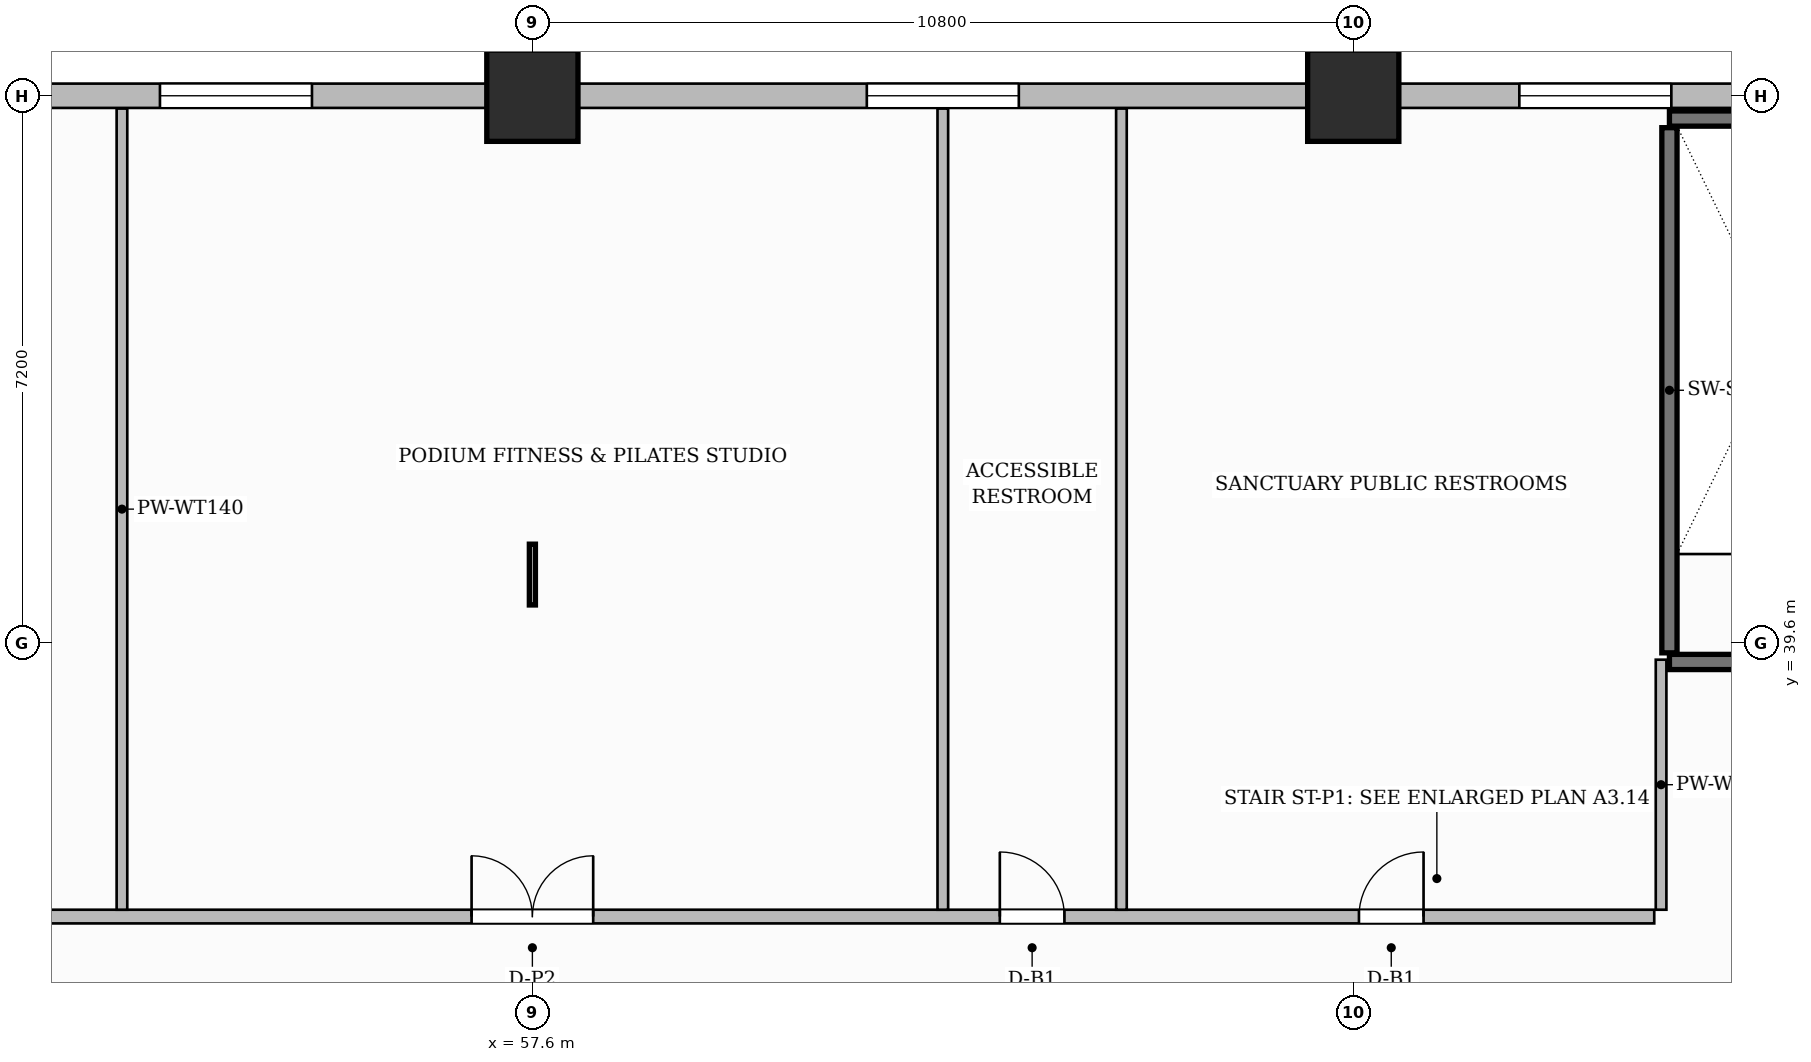
"""IFC4 building model, lengths in metres.
Left out: names, types, materials, properties, quantities, classifications, styles, units other than length and angle.
Written with IfcOpenShell. Run it as: python <this file> out.ifc"""

import sys

from ifc_helpers import new_model, si_unit, direction, frame, frame_2d, origin, origin_2d, place, context, subcontext, project, spatial, rectangle, extrude, source, transform, mapped, element, fill, save


model = new_model("IFC4")
c1 = context("Model", 3, precision=1e-05, world=origin(), true_north=direction((0.0, 1.0)))
c2 = subcontext(c1, "Body", "Model", "MODEL_VIEW")
j1 = project(units=[si_unit("LENGTHUNIT", "METRE"), si_unit("PLANEANGLEUNIT", "RADIAN")], contexts=[c1])
p1 = place(None, origin())
s1 = spatial("IfcSite", under=j1, at=p1, CompositionType="ELEMENT")
p2 = place(p1, origin())
s2 = spatial("IfcBuilding", under=s1, at=p2, CompositionType="ELEMENT")
p3 = place(p2, frame((0.0, 0.0, 21.6)))
s3 = spatial("IfcBuildingStorey", under=s2, at=p3, CompositionType="ELEMENT", Elevation=21.6)
m1 = source(origin(), c2, "Body", "SweptSolid", [
    extrude(rectangle(XDim=1.2, YDim=1.2, at=origin_2d()), origin(), (0.0, 0.0, 1.0), 5.4),
])
for number, where, z_axis, x_axis in (
    (1, (57.6, 46.8, 0.0), (0.0, 0.0, 1.0), (1.0, 0.0, 0.0)),
    (2, (68.4, 46.8, 0.0), (0.0, 0.0, 1.0), (1.0, 0.0, 0.0)),
):
    element("IfcColumn", number, at=place(p3, frame(where, z_axis=z_axis, x_axis=x_axis)), inside=s3, PredefinedType="COLUMN", context=c2, shape_type="MappedRepresentation", body=[
        mapped(m1, transform((0.0, 0.0, 0.0), scale=1.0)),
    ])
p4 = place(p3, frame((72.56, 39.47, 0.0), z_axis=(0.0, 0.0, 1.0), x_axis=(0.0, 1.0, 0.0)))
e3 = element("IfcWall", 3, at=p4, inside=s3, PredefinedType="SHEAR", context=c2, shape_type="SweptSolid", body=[
    extrude(rectangle(XDim=6.91, YDim=0.2, at=frame_2d((3.455, 0.0))), origin(), (0.0, 0.0, 1.0), 5.4),
])
p5 = place(p3, frame((72.56, 46.5, 0.0), z_axis=(0.0, 0.0, 1.0), x_axis=(1.0, 0.0, 0.0)))
e4 = element("IfcWall", 4, at=p5, inside=s3, PredefinedType="SHEAR", context=c2, shape_type="SweptSolid", body=[
    extrude(rectangle(XDim=2.94, YDim=0.2, at=frame_2d((1.47, 0.0))), origin(), (0.0, 0.0, 1.0), 5.4),
])
p6 = place(p3, frame((72.56, 39.35, 0.0), z_axis=(0.0, 0.0, 1.0), x_axis=(1.0, 0.0, 0.0)))
e5 = element("IfcWall", 5, at=p6, inside=s3, PredefinedType="SHEAR", context=c2, shape_type="SweptSolid", body=[
    extrude(rectangle(XDim=2.94, YDim=0.2, at=frame_2d((1.47, 0.0))), origin(), (0.0, 0.0, 1.0), 5.4),
])
p7 = place(p6, frame((0.985, 0.0, 0.0)))
e6 = element("IfcOpeningElement", 6, at=p7, cuts=e5, PredefinedType="OPENING", context=c2, shape_type="SweptSolid", body=[
    extrude(rectangle(XDim=1.05, YDim=2.2, at=frame_2d((0.525, 1.1))), frame((0.0, 0.11, 0.0), z_axis=(0.0, -1.0, 0.0), x_axis=(1.0, 0.0, 0.0)), (0.0, 0.0, 1.0), 0.22),
])
p8 = place(p3, frame((72.45, 36.09, 0.0), z_axis=(0.0, 0.0, 1.0), x_axis=(0.0, 1.0, 0.0)))
e7 = element("IfcWall", 7, at=p8, inside=s3, PredefinedType="PARTITIONING", context=c2, shape_type="SweptSolid", body=[
    extrude(rectangle(XDim=3.29, YDim=0.14, at=frame_2d((1.645, 0.0))), origin(), (0.0, 0.0, 1.0), 5.1),
])
p9 = place(p3, frame((15.89, 36.0, 0.0), z_axis=(0.0, 0.0, 1.0), x_axis=(1.0, 0.0, 0.0)))
e8 = element("IfcWall", 8, at=p9, inside=s3, PredefinedType="PARTITIONING", context=c2, shape_type="SweptSolid", body=[
    extrude(rectangle(XDim=56.47, YDim=0.18, at=frame_2d((28.235, 0.0))), origin(), (0.0, 0.0, 1.0), 2.85),
])
p10 = place(p9, frame((1.335, 0.0, 0.0)))
e9 = element("IfcOpeningElement", 9, at=p10, cuts=e8, PredefinedType="OPENING", context=c2, shape_type="SweptSolid", body=[
    extrude(rectangle(XDim=0.85, YDim=2.1, at=frame_2d((0.425, 1.05))), frame((0.0, 0.1, 0.0), z_axis=(0.0, -1.0, 0.0), x_axis=(1.0, 0.0, 0.0)), (0.0, 0.0, 1.0), 0.2),
])
p11 = place(p9, frame((6.835, 0.0, 0.0)))
e10 = element("IfcOpeningElement", 10, at=p11, cuts=e8, PredefinedType="OPENING", context=c2, shape_type="SweptSolid", body=[
    extrude(rectangle(XDim=0.85, YDim=2.1, at=frame_2d((0.425, 1.05))), frame((0.0, 0.1, 0.0), z_axis=(0.0, -1.0, 0.0), x_axis=(1.0, 0.0, 0.0)), (0.0, 0.0, 1.0), 0.2),
])
p12 = place(p9, frame((16.31, 0.0, 0.0)))
e11 = element("IfcOpeningElement", 11, at=p12, cuts=e8, PredefinedType="OPENING", context=c2, shape_type="SweptSolid", body=[
    extrude(rectangle(XDim=1.6, YDim=2.4, at=frame_2d((0.8, 1.2))), frame((0.0, 0.1, 0.0), z_axis=(0.0, -1.0, 0.0), x_axis=(1.0, 0.0, 0.0)), (0.0, 0.0, 1.0), 0.2),
])
p13 = place(p9, frame((29.01, 0.0, 0.0)))
e12 = element("IfcOpeningElement", 12, at=p13, cuts=e8, PredefinedType="OPENING", context=c2, shape_type="SweptSolid", body=[
    extrude(rectangle(XDim=1.6, YDim=2.4, at=frame_2d((0.8, 1.2))), frame((0.0, 0.1, 0.0), z_axis=(0.0, -1.0, 0.0), x_axis=(1.0, 0.0, 0.0)), (0.0, 0.0, 1.0), 0.2),
])
p14 = place(p9, frame((40.91, 0.0, 0.0)))
e13 = element("IfcOpeningElement", 13, at=p14, cuts=e8, PredefinedType="OPENING", context=c2, shape_type="SweptSolid", body=[
    extrude(rectangle(XDim=1.6, YDim=2.4, at=frame_2d((0.8, 1.2))), frame((0.0, 0.1, 0.0), z_axis=(0.0, -1.0, 0.0), x_axis=(1.0, 0.0, 0.0)), (0.0, 0.0, 1.0), 0.2),
])
p15 = place(p9, frame((47.86, 0.0, 0.0)))
e14 = element("IfcOpeningElement", 14, at=p15, cuts=e8, PredefinedType="OPENING", context=c2, shape_type="SweptSolid", body=[
    extrude(rectangle(XDim=0.85, YDim=2.1, at=frame_2d((0.425, 1.05))), frame((0.0, 0.1, 0.0), z_axis=(0.0, -1.0, 0.0), x_axis=(1.0, 0.0, 0.0)), (0.0, 0.0, 1.0), 0.2),
])
p16 = place(p9, frame((52.585, 0.0, 0.0)))
e15 = element("IfcOpeningElement", 15, at=p16, cuts=e8, PredefinedType="OPENING", context=c2, shape_type="SweptSolid", body=[
    extrude(rectangle(XDim=0.85, YDim=2.1, at=frame_2d((0.425, 1.05))), frame((0.0, 0.1, 0.0), z_axis=(0.0, -1.0, 0.0), x_axis=(1.0, 0.0, 0.0)), (0.0, 0.0, 1.0), 0.2),
])
for number, where, z_axis, x_axis in (
    (16, (52.2, 36.09, 0.0), (0.0, 0.0, 1.0), (0.0, 1.0, 0.0)),
    (17, (63.0, 36.09, 0.0), (0.0, 0.0, 1.0), (0.0, 1.0, 0.0)),
    (18, (65.35, 36.09, 0.0), (0.0, 0.0, 1.0), (0.0, 1.0, 0.0)),
):
    element("IfcWall", number, at=place(p3, frame(where, z_axis=z_axis, x_axis=x_axis)), inside=s3, PredefinedType="PARTITIONING", context=c2, shape_type="SweptSolid", body=[
        extrude(rectangle(XDim=10.542, YDim=0.14, at=frame_2d((5.271, 0.0))), origin(), (0.0, 0.0, 1.0), 5.1),
    ])
p17 = place(p3, frame((49.8, 46.8, 0.0), z_axis=(0.0, 0.0, 1.0), x_axis=(1.0, 0.0, 0.0)))
e19 = element("IfcWall", 19, at=p17, inside=s3, PredefinedType="SOLIDWALL", context=c2, shape_type="SweptSolid", body=[
    extrude(rectangle(XDim=30.6, YDim=0.32, at=frame_2d((15.3, 0.0))), origin(), (0.0, 0.0, 1.0), 5.1),
])
p18 = place(p17, frame((2.9, 0.0, 0.75)))
e20 = element("IfcOpeningElement", 20, at=p18, cuts=e19, PredefinedType="OPENING", context=c2, shape_type="SweptSolid", body=[
    extrude(rectangle(XDim=2.0, YDim=2.6, at=frame_2d((1.0, 1.3))), frame((0.0, 0.17, 0.0), z_axis=(0.0, -1.0, 0.0), x_axis=(1.0, 0.0, 0.0)), (0.0, 0.0, 1.0), 0.34),
])
p19 = place(p17, frame((12.2, 0.0, 0.75)))
e21 = element("IfcOpeningElement", 21, at=p19, cuts=e19, PredefinedType="OPENING", context=c2, shape_type="SweptSolid", body=[
    extrude(rectangle(XDim=2.0, YDim=2.6, at=frame_2d((1.0, 1.3))), frame((0.0, 0.17, 0.0), z_axis=(0.0, -1.0, 0.0), x_axis=(1.0, 0.0, 0.0)), (0.0, 0.0, 1.0), 0.34),
])
p20 = place(p17, frame((20.785, 0.0, 0.75)))
e22 = element("IfcOpeningElement", 22, at=p20, cuts=e19, PredefinedType="OPENING", context=c2, shape_type="SweptSolid", body=[
    extrude(rectangle(XDim=2.0, YDim=2.6, at=frame_2d((1.0, 1.3))), frame((0.0, 0.17, 0.0), z_axis=(0.0, -1.0, 0.0), x_axis=(1.0, 0.0, 0.0)), (0.0, 0.0, 1.0), 0.34),
])
p21 = place(p17, frame((25.445, 0.0, 0.75)))
e23 = element("IfcOpeningElement", 23, at=p21, cuts=e19, PredefinedType="OPENING", context=c2, shape_type="SweptSolid", body=[
    extrude(rectangle(XDim=2.0, YDim=2.6, at=frame_2d((1.0, 1.3))), frame((0.0, 0.17, 0.0), z_axis=(0.0, -1.0, 0.0), x_axis=(1.0, 0.0, 0.0)), (0.0, 0.0, 1.0), 0.34),
])
m2 = source(origin(), c2, "Body", "SweptSolid", [
    extrude(rectangle(XDim=1.6, YDim=2.4, at=frame_2d((0.8, 1.2))), frame((0.0, 0.025, 0.0), z_axis=(0.0, -1.0, 0.0), x_axis=(1.0, 0.0, 0.0)), (0.0, 0.0, 1.0), 0.05),
])
p22 = place(p14, origin())
e24 = element("IfcDoor", 24, at=p22, inside=s3, OperationType="DOUBLE_DOOR_SINGLE_SWING", PredefinedType="DOOR", context=c2, shape_type="MappedRepresentation", body=[
    mapped(m2, transform((0.0, 0.0, 0.0), scale=1.0)),
])
fill(e13, e24)
m3 = source(origin(), c2, "Body", "SweptSolid", [
    extrude(rectangle(XDim=0.85, YDim=2.1, at=frame_2d((0.425, 1.05))), frame((0.0, 0.025, 0.0), z_axis=(0.0, -1.0, 0.0), x_axis=(1.0, 0.0, 0.0)), (0.0, 0.0, 1.0), 0.05),
])
p23 = place(p15, origin())
e25 = element("IfcDoor", 25, at=p23, inside=s3, OperationType="SINGLE_SWING_LEFT", PredefinedType="DOOR", context=c2, shape_type="MappedRepresentation", body=[
    mapped(m3, transform((0.0, 0.0, 0.0), scale=1.0)),
])
fill(e14, e25)
p24 = place(p16, origin())
e26 = element("IfcDoor", 26, at=p24, inside=s3, OperationType="SINGLE_SWING_RIGHT", PredefinedType="DOOR", context=c2, shape_type="MappedRepresentation", body=[
    mapped(m3, transform((0.0, 0.0, 0.0), scale=1.0)),
])
fill(e15, e26)
m4 = source(origin(), c2, "Body", "SweptSolid", [
    extrude(rectangle(XDim=2.0, YDim=2.6, at=frame_2d((1.0, 1.3))), frame((0.0, 0.03, 0.0), z_axis=(0.0, -1.0, 0.0), x_axis=(1.0, 0.0, 0.0)), (0.0, 0.0, 1.0), 0.06),
])
p25 = place(p18, origin())
e27 = element("IfcWindow", 27, at=p25, inside=s3, PartitioningType="DOUBLE_PANEL_VERTICAL", PredefinedType="WINDOW", context=c2, shape_type="MappedRepresentation", body=[
    mapped(m4, transform((0.0, 0.0, 0.0), scale=1.0)),
])
fill(e20, e27)
p26 = place(p19, origin())
e28 = element("IfcWindow", 28, at=p26, inside=s3, PartitioningType="DOUBLE_PANEL_VERTICAL", PredefinedType="WINDOW", context=c2, shape_type="MappedRepresentation", body=[
    mapped(m4, transform((0.0, 0.0, 0.0), scale=1.0)),
])
fill(e21, e28)
p27 = place(p20, origin())
e29 = element("IfcWindow", 29, at=p27, inside=s3, PartitioningType="DOUBLE_PANEL_VERTICAL", PredefinedType="WINDOW", context=c2, shape_type="MappedRepresentation", body=[
    mapped(m4, transform((0.0, 0.0, 0.0), scale=1.0)),
])
fill(e22, e29)
save(model, sys.argv[1])
